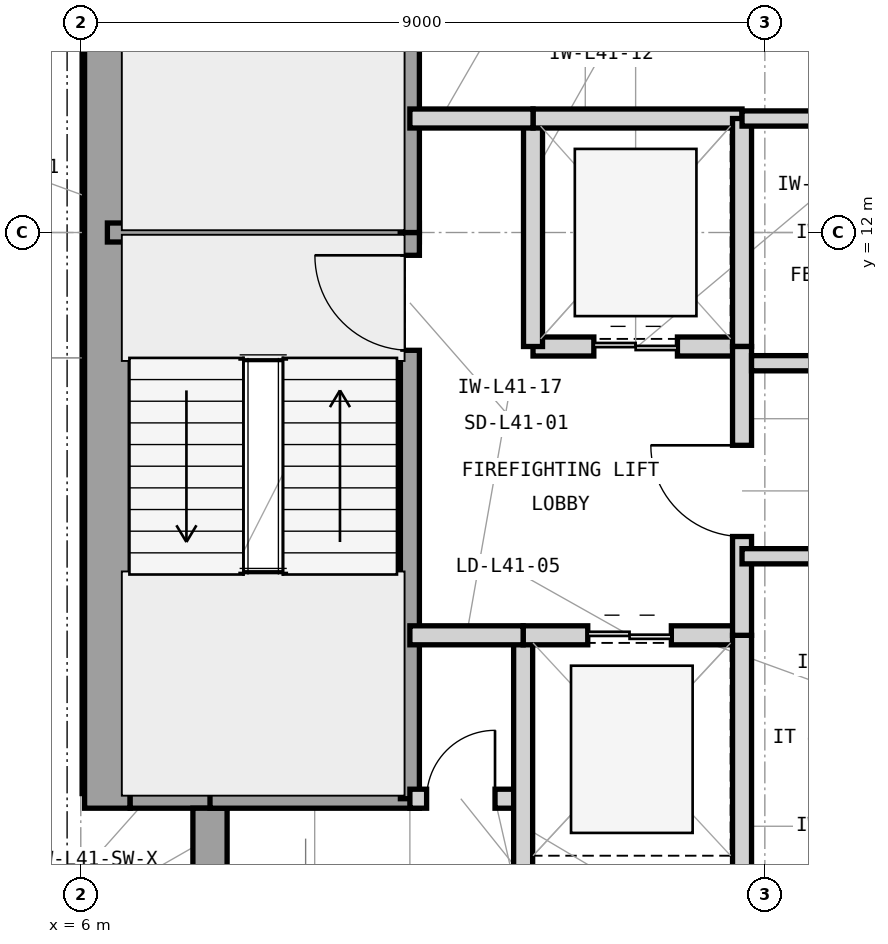
"""IFC4 building model, lengths in metres.
Left out: names, types, materials, properties, quantities, classifications, styles, units other than length and angle.
Written with IfcOpenShell. Run it as: python <this file> out.ifc"""

import sys

from ifc_helpers import new_model, si_unit, direction, frame, frame_2d, origin, place, context, subcontext, project, spatial, rectangle, extrude, element, fill, save


model = new_model("IFC4")
c1 = context("Model", 3, precision=1e-05, world=origin(), true_north=direction((0.0, 1.0)))
c2 = subcontext(c1, "Body", "Model", "MODEL_VIEW")
j1 = project(units=[si_unit("LENGTHUNIT", "METRE"), si_unit("PLANEANGLEUNIT", "RADIAN")], contexts=[c1])
p1 = place(None, origin())
s1 = spatial("IfcSite", under=j1, at=p1, CompositionType="ELEMENT")
p2 = place(p1, origin())
s2 = spatial("IfcBuilding", under=s1, at=p2, CompositionType="ELEMENT")
p3 = place(p2, frame((0.0, 0.0, 172.2)))
s3 = spatial("IfcBuildingStorey", under=s2, at=p3, CompositionType="ELEMENT", Elevation=172.2)
p4 = place(p3, frame((6.35, 4.425, 0.0), z_axis=(0.0, 0.0, 1.0), x_axis=(0.0, 1.0, 0.0)))
e1 = element("IfcWall", 1, at=p4, inside=s3, PredefinedType="SHEAR", context=c2, shape_type="SweptSolid", body=[
    extrude(rectangle(XDim=15.15, YDim=0.6, at=frame_2d((7.575, 0.0))), origin(), (0.0, 0.0, 1.0), 3.9),
])
p5 = place(p3, frame((6.65, 4.65, 0.0), z_axis=(0.0, 0.0, 1.0), x_axis=(1.0, 0.0, 0.0)))
e2 = element("IfcWall", 2, at=p5, inside=s3, PredefinedType="SHEAR", context=c2, shape_type="SweptSolid", body=[
    extrude(rectangle(XDim=1.275, YDim=0.45, at=frame_2d((0.638, 0.0))), origin(), (0.0, 0.0, 1.0), 3.9),
])
p6 = place(p3, frame((7.7, 3.65, 0.0), z_axis=(0.0, 0.0, 1.0), x_axis=(0.0, 1.0, 0.0)))
e3 = element("IfcWall", 3, at=p6, inside=s3, PredefinedType="SHEAR", context=c2, shape_type="SweptSolid", body=[
    extrude(rectangle(XDim=0.775, YDim=0.45, at=frame_2d((0.388, 0.0))), origin(), (0.0, 0.0, 1.0), 3.9),
])
p7 = place(p3, frame((6.35, 12.0, 0.0), z_axis=(0.0, 0.0, 1.0), x_axis=(1.0, 0.0, 0.0)))
e4 = element("IfcWall", 4, at=p7, inside=s3, PredefinedType="SHEAR", context=c2, shape_type="SweptSolid", body=[
    extrude(rectangle(XDim=4.105, YDim=0.25, at=frame_2d((2.052, 0.0))), origin(), (0.0, 0.0, 1.0), 3.9),
])
p8 = place(p3, frame((7.7, 4.55, 0.0), z_axis=(0.0, 0.0, 1.0), x_axis=(1.0, 0.0, 0.0)))
e5 = element("IfcWall", 5, at=p8, inside=s3, PredefinedType="SHEAR", context=c2, shape_type="SweptSolid", body=[
    extrude(rectangle(XDim=2.755, YDim=0.25, at=frame_2d((1.377, 0.0))), origin(), (0.0, 0.0, 1.0), 3.9),
])
p9 = place(p3, frame((10.33, 4.55, 0.0), z_axis=(0.0, 0.0, 1.0), x_axis=(0.0, 1.0, 0.0)))
e6 = element("IfcWall", 6, at=p9, inside=s3, PredefinedType="SHEAR", context=c2, shape_type="SweptSolid", body=[
    extrude(rectangle(XDim=7.45, YDim=0.25, at=frame_2d((3.725, 0.0))), origin(), (0.0, 0.0, 1.0), 3.9),
])
p10 = place(p9, frame((5.9, 0.0, 0.0)))
e7 = element("IfcOpeningElement", 7, at=p10, cuts=e6, PredefinedType="OPENING", context=c2, shape_type="SweptSolid", body=[
    extrude(rectangle(XDim=1.25, YDim=2.2, at=frame_2d((0.625, 1.1))), frame((0.0, 0.135, 0.0), z_axis=(0.0, -1.0, 0.0), x_axis=(1.0, 0.0, 0.0)), (0.0, 0.0, 1.0), 0.27),
])
p11 = place(p3, frame((10.33, 12.0, 0.0), z_axis=(0.0, 0.0, 1.0), x_axis=(0.0, 1.0, 0.0)))
e8 = element("IfcWall", 8, at=p11, inside=s3, PredefinedType="SHEAR", context=c2, shape_type="SweptSolid", body=[
    extrude(rectangle(XDim=7.45, YDim=0.25, at=frame_2d((3.725, 0.0))), origin(), (0.0, 0.0, 1.0), 3.9),
])
p12 = place(p11, frame((5.85, 0.0, 0.0)))
e9 = element("IfcOpeningElement", 9, at=p12, cuts=e8, PredefinedType="OPENING", context=c2, shape_type="SweptSolid", body=[
    extrude(rectangle(XDim=1.25, YDim=2.2, at=frame_2d((0.625, 1.1))), frame((0.0, 0.135, 0.0), z_axis=(0.0, -1.0, 0.0), x_axis=(1.0, 0.0, 0.0)), (0.0, 0.0, 1.0), 0.27),
])
p13 = place(p3, frame((10.33, 4.55, 0.0), z_axis=(0.0, 0.0, 1.0), x_axis=(1.0, 0.0, 0.0)))
e10 = element("IfcWall", 10, at=p13, inside=s3, PredefinedType="PARTITIONING", context=c2, shape_type="SweptSolid", body=[
    extrude(rectangle(XDim=1.49, YDim=0.25, at=frame_2d((0.745, 0.0))), origin(), (0.0, 0.0, 1.0), 3.69),
])
p14 = place(p13, frame((0.22, 0.0, 0.0)))
e11 = element("IfcOpeningElement", 11, at=p14, cuts=e10, PredefinedType="OPENING", context=c2, shape_type="SweptSolid", body=[
    extrude(rectangle(XDim=0.9, YDim=2.1, at=frame_2d((0.45, 1.05))), frame((0.0, 0.135, 0.0), z_axis=(0.0, -1.0, 0.0), x_axis=(1.0, 0.0, 0.0)), (0.0, 0.0, 1.0), 0.27),
])
p15 = place(p3, frame((11.82, 3.35, 0.0), z_axis=(0.0, 0.0, 1.0), x_axis=(0.0, 1.0, 0.0)))
e12 = element("IfcWall", 12, at=p15, inside=s3, PredefinedType="PARTITIONING", context=c2, shape_type="SweptSolid", body=[
    extrude(rectangle(XDim=3.35, YDim=0.25, at=frame_2d((1.675, 0.0))), origin(), (0.0, 0.0, 1.0), 3.69),
])
p16 = place(p3, frame((11.82, 6.7, 0.0), z_axis=(0.0, 0.0, 1.0), x_axis=(1.0, 0.0, 0.0)))
e13 = element("IfcWall", 13, at=p16, inside=s3, PredefinedType="PARTITIONING", context=c2, shape_type="SweptSolid", body=[
    extrude(rectangle(XDim=2.88, YDim=0.25, at=frame_2d((1.44, 0.0))), origin(), (0.0, 0.0, 1.0), 3.283),
])
p17 = place(p16, frame((0.85, 0.0, 0.0)))
e14 = element("IfcOpeningElement", 14, at=p17, cuts=e13, PredefinedType="OPENING", context=c2, shape_type="SweptSolid", body=[
    extrude(rectangle(XDim=1.1, YDim=2.25, at=frame_2d((0.55, 1.125))), frame((0.0, 0.135, 0.0), z_axis=(0.0, -1.0, 0.0), x_axis=(1.0, 0.0, 0.0)), (0.0, 0.0, 1.0), 0.27),
])
p18 = place(p3, frame((14.7, 3.35, 0.0), z_axis=(0.0, 0.0, 1.0), x_axis=(0.0, 1.0, 0.0)))
e15 = element("IfcWall", 15, at=p18, inside=s3, PredefinedType="PARTITIONING", context=c2, shape_type="SweptSolid", body=[
    extrude(rectangle(XDim=3.35, YDim=0.25, at=frame_2d((1.675, 0.0))), origin(), (0.0, 0.0, 1.0), 3.69),
])
p19 = place(p3, frame((11.95, 10.5, 0.0), z_axis=(0.0, 0.0, 1.0), x_axis=(1.0, 0.0, 0.0)))
e16 = element("IfcWall", 16, at=p19, inside=s3, PredefinedType="PARTITIONING", context=c2, shape_type="SweptSolid", body=[
    extrude(rectangle(XDim=2.75, YDim=0.25, at=frame_2d((1.375, 0.0))), origin(), (0.0, 0.0, 1.0), 3.283),
])
p20 = place(p19, frame((0.8, 0.0, 0.0)))
e17 = element("IfcOpeningElement", 17, at=p20, cuts=e16, PredefinedType="OPENING", context=c2, shape_type="SweptSolid", body=[
    extrude(rectangle(XDim=1.1, YDim=2.25, at=frame_2d((0.55, 1.125))), frame((0.0, 0.135, 0.0), z_axis=(0.0, -1.0, 0.0), x_axis=(1.0, 0.0, 0.0)), (0.0, 0.0, 1.0), 0.27),
])
p21 = place(p3, frame((11.95, 10.5, 0.0), z_axis=(0.0, 0.0, 1.0), x_axis=(0.0, 1.0, 0.0)))
e18 = element("IfcWall", 18, at=p21, inside=s3, PredefinedType="PARTITIONING", context=c2, shape_type="SweptSolid", body=[
    extrude(rectangle(XDim=3.0, YDim=0.25, at=frame_2d((1.5, 0.0))), origin(), (0.0, 0.0, 1.0), 3.69),
])
p22 = place(p3, frame((11.95, 13.5, 0.0), z_axis=(0.0, 0.0, 1.0), x_axis=(1.0, 0.0, 0.0)))
e19 = element("IfcWall", 19, at=p22, inside=s3, PredefinedType="PARTITIONING", context=c2, shape_type="SweptSolid", body=[
    extrude(rectangle(XDim=2.75, YDim=0.25, at=frame_2d((1.375, 0.0))), origin(), (0.0, 0.0, 1.0), 3.283),
])
p23 = place(p3, frame((14.7, 10.5, 0.0), z_axis=(0.0, 0.0, 1.0), x_axis=(0.0, 1.0, 0.0)))
e20 = element("IfcWall", 20, at=p23, inside=s3, PredefinedType="PARTITIONING", context=c2, shape_type="SweptSolid", body=[
    extrude(rectangle(XDim=3.0, YDim=0.25, at=frame_2d((1.5, 0.0))), origin(), (0.0, 0.0, 1.0), 3.69),
])
p24 = place(p3, frame((14.7, 6.7, 0.0), z_axis=(0.0, 0.0, 1.0), x_axis=(0.0, 1.0, 0.0)))
e21 = element("IfcWall", 21, at=p24, inside=s3, PredefinedType="PARTITIONING", context=c2, shape_type="SweptSolid", body=[
    extrude(rectangle(XDim=3.8, YDim=0.25, at=frame_2d((1.9, 0.0))), origin(), (0.0, 0.0, 1.0), 3.69),
])
p25 = place(p24, frame((1.3, 0.0, 0.0)))
e22 = element("IfcOpeningElement", 22, at=p25, cuts=e21, PredefinedType="OPENING", context=c2, shape_type="SweptSolid", body=[
    extrude(rectangle(XDim=1.2, YDim=2.2, at=frame_2d((0.6, 1.1))), frame((0.0, 0.135, 0.0), z_axis=(0.0, -1.0, 0.0), x_axis=(1.0, 0.0, 0.0)), (0.0, 0.0, 1.0), 0.27),
])
p26 = place(p3, frame((10.33, 13.5, 0.0), z_axis=(0.0, 0.0, 1.0), x_axis=(1.0, 0.0, 0.0)))
e23 = element("IfcWall", 23, at=p26, inside=s3, PredefinedType="PARTITIONING", context=c2, shape_type="SweptSolid", body=[
    extrude(rectangle(XDim=1.62, YDim=0.25, at=frame_2d((0.81, 0.0))), origin(), (0.0, 0.0, 1.0), 3.283),
])
p27 = place(p3, frame((10.33, 6.7, 0.0), z_axis=(0.0, 0.0, 1.0), x_axis=(1.0, 0.0, 0.0)))
e24 = element("IfcWall", 24, at=p27, inside=s3, PredefinedType="PARTITIONING", context=c2, shape_type="SweptSolid", body=[
    extrude(rectangle(XDim=1.49, YDim=0.25, at=frame_2d((0.745, 0.0))), origin(), (0.0, 0.0, 1.0), 3.283),
])
p28 = place(p3, frame((14.7, 7.74, 0.0), z_axis=(0.0, 0.0, 1.0), x_axis=(1.0, 0.0, 0.0)))
e25 = element("IfcWall", 25, at=p28, inside=s3, PredefinedType="PARTITIONING", context=c2, shape_type="SweptSolid", body=[
    extrude(rectangle(XDim=2.95, YDim=0.2, at=frame_2d((1.475, 0.0))), origin(), (0.0, 0.0, 1.0), 3.69),
])
p29 = place(p28, frame((1.025, 0.0, 0.0)))
e26 = element("IfcOpeningElement", 26, at=p29, cuts=e25, PredefinedType="OPENING", context=c2, shape_type="SweptSolid", body=[
    extrude(rectangle(XDim=0.9, YDim=2.1, at=frame_2d((0.45, 1.05))), frame((0.0, 0.11, 0.0), z_axis=(0.0, -1.0, 0.0), x_axis=(1.0, 0.0, 0.0)), (0.0, 0.0, 1.0), 0.22),
])
p30 = place(p3, frame((14.825, 10.28, 0.0), z_axis=(0.0, 0.0, 1.0), x_axis=(1.0, 0.0, 0.0)))
e27 = element("IfcWall", 27, at=p30, inside=s3, PredefinedType="PARTITIONING", context=c2, shape_type="SweptSolid", body=[
    extrude(rectangle(XDim=8.825, YDim=0.2, at=frame_2d((4.413, 0.0))), origin(), (0.0, 0.0, 1.0), 3.69),
])
p31 = place(p3, frame((14.7, 13.5, 0.0), z_axis=(0.0, 0.0, 1.0), x_axis=(1.0, 0.0, 0.0)))
e28 = element("IfcWall", 28, at=p31, inside=s3, PredefinedType="PARTITIONING", context=c2, shape_type="SweptSolid", body=[
    extrude(rectangle(XDim=3.75, YDim=0.2, at=frame_2d((1.875, 0.0))), origin(), (0.0, 0.0, 1.0), 3.283),
])
p32 = place(p31, frame((1.4, 0.0, 0.0)))
e29 = element("IfcOpeningElement", 29, at=p32, cuts=e28, PredefinedType="OPENING", context=c2, shape_type="SweptSolid", body=[
    extrude(rectangle(XDim=0.95, YDim=2.1, at=frame_2d((0.475, 1.05))), frame((0.0, 0.11, 0.0), z_axis=(0.0, -1.0, 0.0), x_axis=(1.0, 0.0, 0.0)), (0.0, 0.0, 1.0), 0.22),
])
p33 = place(p10, origin())
e30 = element("IfcDoor", 30, at=p33, inside=s3, OperationType="SINGLE_SWING_RIGHT", PredefinedType="DOOR", context=c2, shape_type="SweptSolid", body=[
    extrude(rectangle(XDim=1.25, YDim=2.2, at=frame_2d((0.625, 1.1))), frame((0.0, 0.025, 0.0), z_axis=(0.0, -1.0, 0.0), x_axis=(1.0, 0.0, 0.0)), (0.0, 0.0, 1.0), 0.05),
])
fill(e7, e30)
p34 = place(p14, origin())
e31 = element("IfcDoor", 31, at=p34, inside=s3, OperationType="SINGLE_SWING_RIGHT", PredefinedType="TRAPDOOR", context=c2, shape_type="SweptSolid", body=[
    extrude(rectangle(XDim=0.9, YDim=2.1, at=frame_2d((0.45, 1.05))), frame((0.0, 0.025, 0.0), z_axis=(0.0, -1.0, 0.0), x_axis=(1.0, 0.0, 0.0)), (0.0, 0.0, 1.0), 0.05),
])
fill(e11, e31)
p35 = place(p17, origin())
e32 = element("IfcDoor", 32, at=p35, inside=s3, OperationType="DOUBLE_DOOR_SLIDING", PredefinedType="DOOR", context=c2, shape_type="SweptSolid", body=[
    extrude(rectangle(XDim=1.1, YDim=2.25, at=frame_2d((0.55, 1.125))), frame((0.0, 0.025, 0.0), z_axis=(0.0, -1.0, 0.0), x_axis=(1.0, 0.0, 0.0)), (0.0, 0.0, 1.0), 0.05),
])
fill(e14, e32)
p36 = place(p20, origin())
e33 = element("IfcDoor", 33, at=p36, inside=s3, OperationType="DOUBLE_DOOR_SLIDING", PredefinedType="DOOR", context=c2, shape_type="SweptSolid", body=[
    extrude(rectangle(XDim=1.1, YDim=2.25, at=frame_2d((0.55, 1.125))), frame((0.0, 0.025, 0.0), z_axis=(0.0, -1.0, 0.0), x_axis=(1.0, 0.0, 0.0)), (0.0, 0.0, 1.0), 0.05),
])
fill(e17, e33)
p37 = place(p25, origin())
e34 = element("IfcDoor", 34, at=p37, inside=s3, OperationType="SINGLE_SWING_RIGHT", PredefinedType="DOOR", context=c2, shape_type="SweptSolid", body=[
    extrude(rectangle(XDim=1.2, YDim=2.2, at=frame_2d((0.6, 1.1))), frame((0.0, 0.025, 0.0), z_axis=(0.0, -1.0, 0.0), x_axis=(1.0, 0.0, 0.0)), (0.0, 0.0, 1.0), 0.05),
])
fill(e22, e34)
save(model, sys.argv[1])
